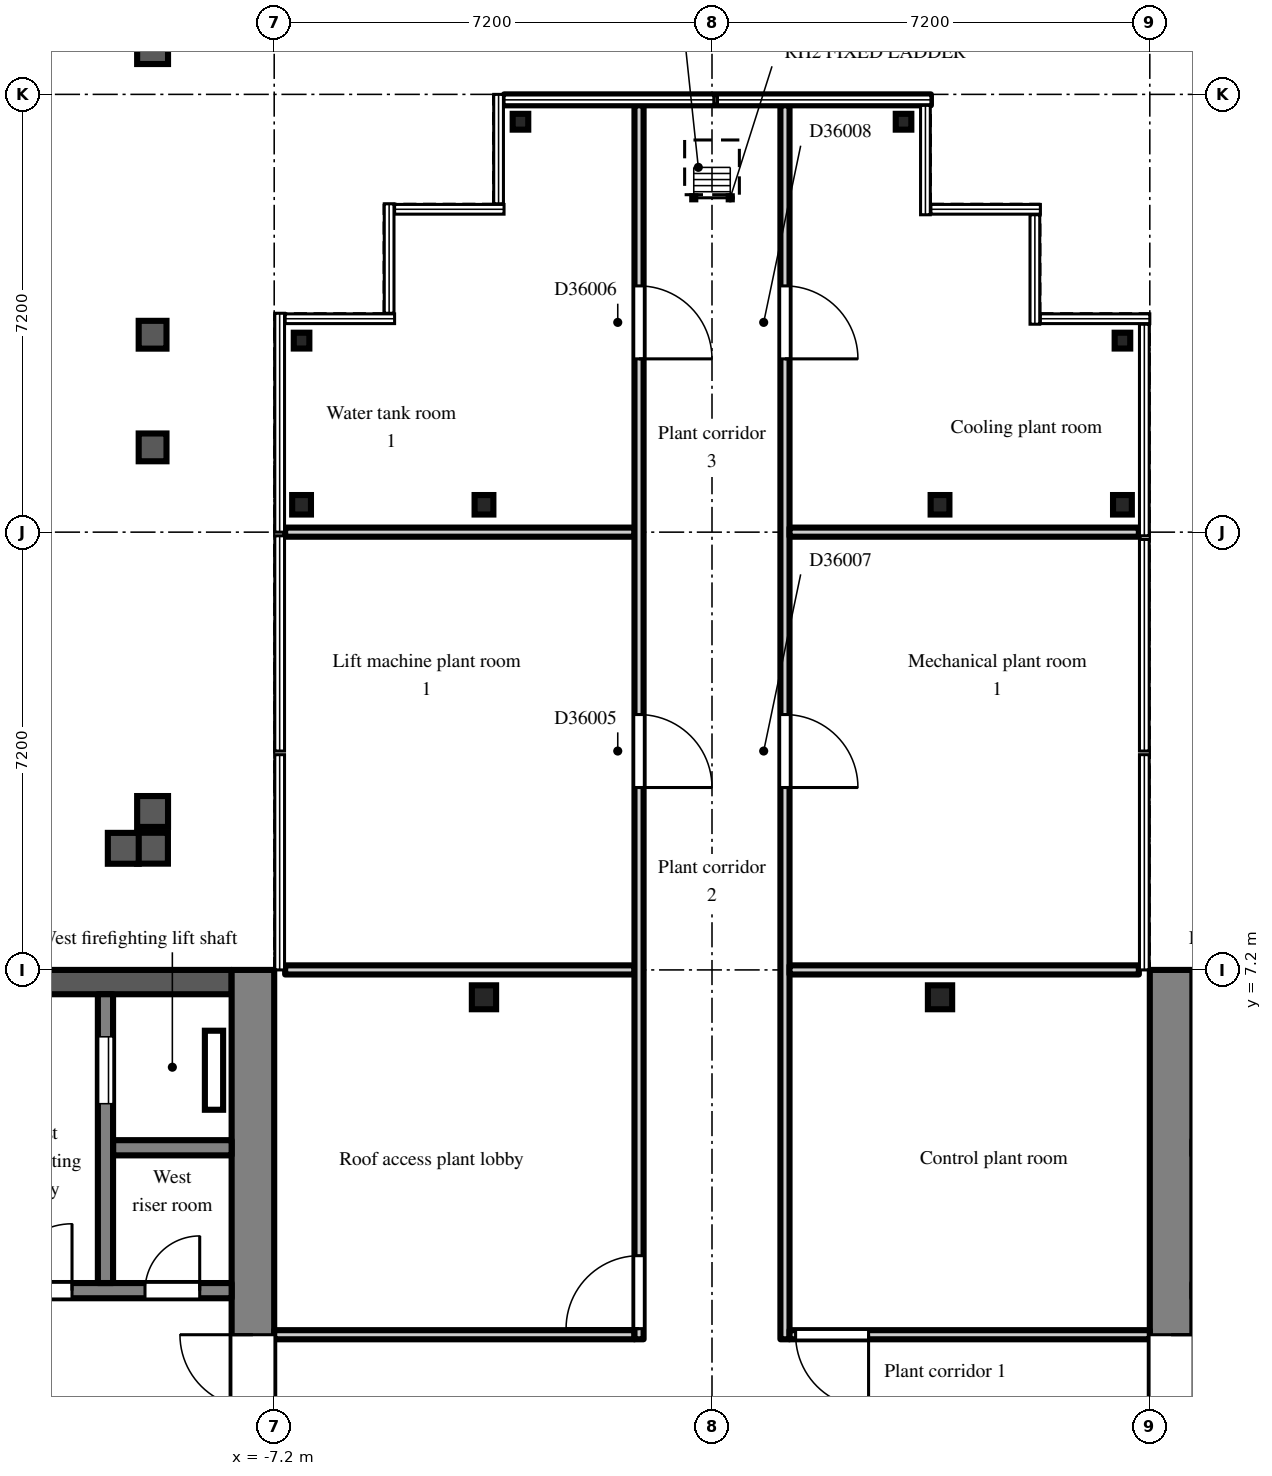
"""IFC4 building model, lengths in metres.
Left out: names, types, materials, properties, quantities, classifications, styles, units other than length and angle.
Written with IfcOpenShell. Run it as: python <this file> out.ifc"""

import sys

from ifc_helpers import new_model, si_unit, direction, frame, frame_2d, origin, origin_2d, place, context, subcontext, project, spatial, polyline, rectangle, i_section, outline, extrude, element, fill, save


model = new_model("IFC4")
c1 = context("Model", 3, precision=1e-05, world=origin(), true_north=direction((0.0, 1.0)))
c2 = subcontext(c1, "Body", "Model", "MODEL_VIEW")
j1 = project(units=[si_unit("LENGTHUNIT", "METRE"), si_unit("PLANEANGLEUNIT", "RADIAN")], contexts=[c1])
p1 = place(None, origin())
s1 = spatial("IfcSite", under=j1, at=p1, CompositionType="ELEMENT")
p2 = place(p1, origin())
s2 = spatial("IfcBuilding", under=s1, at=p2, CompositionType="ELEMENT")
p3 = place(p2, frame((0.0, 0.0, 247.5)))
s3 = spatial("IfcBuildingStorey", under=s2, at=p3, CompositionType="ELEMENT", Elevation=247.5)
p4 = place(p3, frame((-6.75, 14.85, 0.0), z_axis=(0.0, 0.0, 1.0), x_axis=(1.0, 0.0, 0.0)))
e1 = element("IfcColumn", 1, at=p4, inside=s3, PredefinedType="COLUMN", context=c2, shape_type="SweptSolid", body=[
    extrude(i_section(OverallWidth=0.309, OverallDepth=0.321, WebThickness=0.014, FlangeThickness=0.022, FilletRadius=0.015, at=origin_2d()), origin(), (0.0, 0.0, 1.0), 5.462),
])
p5 = place(p3, frame((-6.75, 17.55, 0.0), z_axis=(0.0, 0.0, 1.0), x_axis=(1.0, 0.0, 0.0)))
e2 = element("IfcColumn", 2, at=p5, inside=s3, PredefinedType="COLUMN", context=c2, shape_type="SweptSolid", body=[
    extrude(i_section(OverallWidth=0.256, OverallDepth=0.26, WebThickness=0.01, FlangeThickness=0.017, FilletRadius=0.013, at=origin_2d()), origin(), (0.0, 0.0, 1.0), 4.087),
])
p6 = place(p3, frame((-3.75, 6.75, 0.0), z_axis=(0.0, 0.0, 1.0), x_axis=(1.0, 0.0, 0.0)))
e3 = element("IfcColumn", 3, at=p6, inside=s3, PredefinedType="COLUMN", context=c2, shape_type="SweptSolid", body=[
    extrude(i_section(OverallWidth=0.399, OverallDepth=0.394, WebThickness=0.023, FlangeThickness=0.037, FilletRadius=0.015, at=origin_2d()), origin(), (0.0, 0.0, 1.0), 9.663),
])
p7 = place(p3, frame((-3.75, 14.85, 0.0), z_axis=(0.0, 0.0, 1.0), x_axis=(1.0, 0.0, 0.0)))
e4 = element("IfcColumn", 4, at=p7, inside=s3, PredefinedType="COLUMN", context=c2, shape_type="SweptSolid", body=[
    extrude(i_section(OverallWidth=0.309, OverallDepth=0.321, WebThickness=0.014, FlangeThickness=0.022, FilletRadius=0.015, at=origin_2d()), origin(), (0.0, 0.0, 1.0), 5.538),
])
for number, where, z_axis, x_axis in (
    (5, (-3.15, 21.15, 0.0), (0.0, 0.0, 1.0), (1.0, 0.0, 0.0)),
    (6, (3.15, 21.15, 0.0), (0.0, 0.0, 1.0), (1.0, 0.0, 0.0)),
):
    element("IfcColumn", number, at=place(p3, frame(where, z_axis=z_axis, x_axis=x_axis)), inside=s3, PredefinedType="COLUMN", context=c2, shape_type="SweptSolid", body=[
        extrude(i_section(OverallWidth=0.256, OverallDepth=0.26, WebThickness=0.01, FlangeThickness=0.017, FilletRadius=0.013, at=origin_2d()), origin(), (0.0, 0.0, 1.0), 2.479),
    ])
p8 = place(p3, frame((3.75, 6.75, 0.0), z_axis=(0.0, 0.0, 1.0), x_axis=(1.0, 0.0, 0.0)))
e7 = element("IfcColumn", 7, at=p8, inside=s3, PredefinedType="COLUMN", context=c2, shape_type="SweptSolid", body=[
    extrude(i_section(OverallWidth=0.399, OverallDepth=0.394, WebThickness=0.023, FlangeThickness=0.037, FilletRadius=0.015, at=origin_2d()), origin(), (0.0, 0.0, 1.0), 9.663),
])
p9 = place(p3, frame((3.75, 14.85, 0.0), z_axis=(0.0, 0.0, 1.0), x_axis=(1.0, 0.0, 0.0)))
e8 = element("IfcColumn", 8, at=p9, inside=s3, PredefinedType="COLUMN", context=c2, shape_type="SweptSolid", body=[
    extrude(i_section(OverallWidth=0.309, OverallDepth=0.321, WebThickness=0.014, FlangeThickness=0.022, FilletRadius=0.015, at=origin_2d()), origin(), (0.0, 0.0, 1.0), 5.538),
])
p10 = place(p3, frame((6.75, 14.85, 0.0), z_axis=(0.0, 0.0, 1.0), x_axis=(1.0, 0.0, 0.0)))
e9 = element("IfcColumn", 9, at=p10, inside=s3, PredefinedType="COLUMN", context=c2, shape_type="SweptSolid", body=[
    extrude(i_section(OverallWidth=0.309, OverallDepth=0.321, WebThickness=0.014, FlangeThickness=0.022, FilletRadius=0.015, at=origin_2d()), origin(), (0.0, 0.0, 1.0), 5.462),
])
p11 = place(p3, frame((6.75, 17.55, 0.0), z_axis=(0.0, 0.0, 1.0), x_axis=(1.0, 0.0, 0.0)))
e10 = element("IfcColumn", 10, at=p11, inside=s3, PredefinedType="COLUMN", context=c2, shape_type="SweptSolid", body=[
    extrude(i_section(OverallWidth=0.256, OverallDepth=0.26, WebThickness=0.01, FlangeThickness=0.017, FilletRadius=0.013, at=origin_2d()), origin(), (0.0, 0.0, 1.0), 4.087),
])
p12 = place(p3, frame((3.6, 21.51, 3.127), z_axis=(0.0, 0.0, 1.0), x_axis=(-1.0, 0.0, 0.0)))
e11 = element("IfcWall", 11, at=p12, inside=s3, PredefinedType="PARAPET", context=c2, shape_type="SweptSolid", body=[
    extrude(rectangle(XDim=7.02, YDim=0.18, at=frame_2d((3.51, 0.0))), origin(), (0.0, 0.0, 1.0), 1.1),
])
p13 = place(p3, frame((7.55, -7.2, 0.0), z_axis=(0.0, 0.0, 1.0), x_axis=(0.0, 1.0, 0.0)))
e12 = element("IfcWall", 12, at=p13, inside=s3, PredefinedType="SHEAR", context=c2, shape_type="SweptSolid", body=[
    extrude(outline(polyline([(0.0, 0.0), (14.4, 0.0), (14.4, 10.033), (7.2, 13.7), (0.0, 10.033), (0.0, 0.0)])), frame((0.0, 0.35, 0.0), z_axis=(0.0, -1.0, 0.0), x_axis=(1.0, 0.0, 0.0)), (0.0, 0.0, 1.0), 0.7),
])
p14 = place(p13, frame((6.0, 0.0, 0.0)))
e13 = element("IfcOpeningElement", 13, at=p14, cuts=e12, PredefinedType="OPENING", context=c2, shape_type="SweptSolid", body=[
    extrude(rectangle(XDim=2.4, YDim=2.2, at=frame_2d((1.2, 1.1))), frame((0.0, 0.36, 0.0), z_axis=(0.0, -1.0, 0.0), x_axis=(1.0, 0.0, 0.0)), (0.0, 0.0, 1.0), 0.72),
])
p15 = place(p3, frame((-7.55, -7.2, 0.0), z_axis=(0.0, 0.0, 1.0), x_axis=(0.0, 1.0, 0.0)))
e14 = element("IfcWall", 14, at=p15, inside=s3, PredefinedType="SHEAR", context=c2, shape_type="SweptSolid", body=[
    extrude(outline(polyline([(0.0, 0.0), (14.4, 0.0), (14.4, 10.033), (7.2, 13.7), (0.0, 10.033), (0.0, 0.0)])), frame((0.0, 0.35, 0.0), z_axis=(0.0, -1.0, 0.0), x_axis=(1.0, 0.0, 0.0)), (0.0, 0.0, 1.0), 0.7),
])
p16 = place(p15, frame((6.0, 0.0, 0.0)))
e15 = element("IfcOpeningElement", 15, at=p16, cuts=e14, PredefinedType="OPENING", context=c2, shape_type="SweptSolid", body=[
    extrude(rectangle(XDim=2.4, YDim=2.2, at=frame_2d((1.2, 1.1))), frame((0.0, 0.36, 0.0), z_axis=(0.0, -1.0, 0.0), x_axis=(1.0, 0.0, 0.0)), (0.0, 0.0, 1.0), 0.72),
])
p17 = place(p3, frame((-7.9, 7.0, 0.0), z_axis=(0.0, 0.0, 1.0), x_axis=(-1.0, 0.0, 0.0)))
e16 = element("IfcWall", 16, at=p17, inside=s3, PredefinedType="SHEAR", context=c2, shape_type="SweptSolid", body=[
    extrude(rectangle(XDim=12.95, YDim=0.4, at=frame_2d((6.475, 0.0))), origin(), (0.0, 0.0, 1.0), 10.135),
])
p18 = place(p3, frame((-7.9, 1.925, 0.0), z_axis=(0.0, 0.0, 1.0), x_axis=(-1.0, 0.0, 0.0)))
e17 = element("IfcWall", 17, at=p18, inside=s3, PredefinedType="SHEAR", context=c2, shape_type="SweptSolid", body=[
    extrude(rectangle(XDim=12.95, YDim=0.25, at=frame_2d((6.475, 0.0))), origin(), (0.0, 0.0, 1.0), 12.72),
])
p19 = place(p18, frame((0.525, 0.0, 0.0)))
e18 = element("IfcOpeningElement", 18, at=p19, cuts=e17, PredefinedType="OPENING", context=c2, shape_type="SweptSolid", body=[
    extrude(rectangle(XDim=0.9, YDim=2.1, at=frame_2d((0.45, 1.05))), frame((0.0, 0.135, 0.0), z_axis=(0.0, -1.0, 0.0), x_axis=(1.0, 0.0, 0.0)), (0.0, 0.0, 1.0), 0.27),
])
p20 = place(p18, frame((2.625, 0.0, 0.0)))
e19 = element("IfcOpeningElement", 19, at=p20, cuts=e17, PredefinedType="OPENING", context=c2, shape_type="SweptSolid", body=[
    extrude(rectangle(XDim=1.1, YDim=2.1, at=frame_2d((0.55, 1.05))), frame((0.0, 0.135, 0.0), z_axis=(0.0, -1.0, 0.0), x_axis=(1.0, 0.0, 0.0)), (0.0, 0.0, 1.0), 0.27),
])
p21 = place(p18, frame((4.925, 0.0, 0.0)))
e20 = element("IfcOpeningElement", 20, at=p21, cuts=e17, PredefinedType="OPENING", context=c2, shape_type="SweptSolid", body=[
    extrude(rectangle(XDim=0.9, YDim=2.1, at=frame_2d((0.45, 1.05))), frame((0.0, 0.135, 0.0), z_axis=(0.0, -1.0, 0.0), x_axis=(1.0, 0.0, 0.0)), (0.0, 0.0, 1.0), 0.27),
])
p22 = place(p18, frame((8.225, 0.0, 0.0)))
e21 = element("IfcOpeningElement", 21, at=p22, cuts=e17, PredefinedType="OPENING", context=c2, shape_type="SweptSolid", body=[
    extrude(rectangle(XDim=0.9, YDim=2.1, at=frame_2d((0.45, 1.05))), frame((0.0, 0.135, 0.0), z_axis=(0.0, -1.0, 0.0), x_axis=(1.0, 0.0, 0.0)), (0.0, 0.0, 1.0), 0.27),
])
p23 = place(p18, frame((11.525, 0.0, 0.0)))
e22 = element("IfcOpeningElement", 22, at=p23, cuts=e17, PredefinedType="OPENING", context=c2, shape_type="SweptSolid", body=[
    extrude(rectangle(XDim=0.9, YDim=2.1, at=frame_2d((0.45, 1.05))), frame((0.0, 0.135, 0.0), z_axis=(0.0, -1.0, 0.0), x_axis=(1.0, 0.0, 0.0)), (0.0, 0.0, 1.0), 0.27),
])
p24 = place(p3, frame((-7.9, 4.275, 0.0), z_axis=(0.0, 0.0, 1.0), x_axis=(-1.0, 0.0, 0.0)))
e23 = element("IfcWall", 23, at=p24, inside=s3, PredefinedType="SHEAR", context=c2, shape_type="SweptSolid", body=[
    extrude(rectangle(XDim=1.95, YDim=0.25, at=frame_2d((0.975, 0.0))), origin(), (0.0, 0.0, 1.0), 11.523),
])
p25 = place(p3, frame((-9.975, 2.05, 0.0), z_axis=(0.0, 0.0, 1.0), x_axis=(0.0, 1.0, 0.0)))
e24 = element("IfcWall", 24, at=p25, inside=s3, PredefinedType="SHEAR", context=c2, shape_type="SweptSolid", body=[
    extrude(outline(polyline([(0.0, 0.0), (4.75, 0.0), (4.75, 10.237), (0.0, 12.656), (0.0, 0.0)])), frame((0.0, 0.125, 0.0), z_axis=(0.0, -1.0, 0.0), x_axis=(1.0, 0.0, 0.0)), (0.0, 0.0, 1.0), 0.25),
])
p26 = place(p25, frame((2.95, 0.0, 0.0)))
e25 = element("IfcOpeningElement", 25, at=p26, cuts=e24, PredefinedType="OPENING", context=c2, shape_type="SweptSolid", body=[
    extrude(rectangle(XDim=1.1, YDim=2.1, at=frame_2d((0.55, 1.05))), frame((0.0, 0.135, 0.0), z_axis=(0.0, -1.0, 0.0), x_axis=(1.0, 0.0, 0.0)), (0.0, 0.0, 1.0), 0.27),
])
p27 = place(p3, frame((-7.2, 1.2, 0.0), z_axis=(0.0, 0.0, 1.0), x_axis=(1.0, 0.0, 0.0)))
e26 = element("IfcWall", 26, at=p27, inside=s3, PredefinedType="PARTITIONING", context=c2, shape_type="SweptSolid", body=[
    extrude(rectangle(XDim=5.925, YDim=0.15, at=frame_2d((2.962, 0.0))), origin(), (0.0, 0.0, 1.0), 2.7),
])
for number, where, z_axis, x_axis in (
    (27, (-7.02, 7.2, 0.0), (0.0, 0.0, 1.0), (1.0, 0.0, 0.0)),
    (28, (-7.02, 14.4, 0.0), (0.0, 0.0, 1.0), (1.0, 0.0, 0.0)),
):
    element("IfcWall", number, at=place(p3, frame(where, z_axis=z_axis, x_axis=x_axis)), inside=s3, PredefinedType="PARTITIONING", context=c2, shape_type="SweptSolid", body=[
        extrude(rectangle(XDim=5.745, YDim=0.15, at=frame_2d((2.873, 0.0))), origin(), (0.0, 0.0, 1.0), 2.7),
    ])
p28 = place(p3, frame((-1.2, 1.125, 0.0), z_axis=(0.0, 0.0, 1.0), x_axis=(0.0, 1.0, 0.0)))
e29 = element("IfcWall", 29, at=p28, inside=s3, PredefinedType="PARTITIONING", context=c2, shape_type="SweptSolid", body=[
    extrude(rectangle(XDim=20.295, YDim=0.15, at=frame_2d((10.147, 0.0))), origin(), (0.0, 0.0, 1.0), 2.7),
])
p29 = place(p28, frame((0.175, 0.0, 0.0)))
e30 = element("IfcOpeningElement", 30, at=p29, cuts=e29, PredefinedType="OPENING", context=c2, shape_type="SweptSolid", body=[
    extrude(rectangle(XDim=1.2, YDim=2.1, at=frame_2d((0.6, 1.05))), frame((0.0, 0.085, 0.0), z_axis=(0.0, -1.0, 0.0), x_axis=(1.0, 0.0, 0.0)), (0.0, 0.0, 1.0), 0.17),
])
p30 = place(p28, frame((9.075, 0.0, 0.0)))
e31 = element("IfcOpeningElement", 31, at=p30, cuts=e29, PredefinedType="OPENING", context=c2, shape_type="SweptSolid", body=[
    extrude(rectangle(XDim=1.2, YDim=2.1, at=frame_2d((0.6, 1.05))), frame((0.0, 0.085, 0.0), z_axis=(0.0, -1.0, 0.0), x_axis=(1.0, 0.0, 0.0)), (0.0, 0.0, 1.0), 0.17),
])
p31 = place(p28, frame((16.125, 0.0, 0.0)))
e32 = element("IfcOpeningElement", 32, at=p31, cuts=e29, PredefinedType="OPENING", context=c2, shape_type="SweptSolid", body=[
    extrude(rectangle(XDim=1.2, YDim=2.1, at=frame_2d((0.6, 1.05))), frame((0.0, 0.085, 0.0), z_axis=(0.0, -1.0, 0.0), x_axis=(1.0, 0.0, 0.0)), (0.0, 0.0, 1.0), 0.17),
])
p32 = place(p3, frame((1.2, 1.125, 0.0), z_axis=(0.0, 0.0, 1.0), x_axis=(0.0, 1.0, 0.0)))
e33 = element("IfcWall", 33, at=p32, inside=s3, PredefinedType="PARTITIONING", context=c2, shape_type="SweptSolid", body=[
    extrude(rectangle(XDim=20.295, YDim=0.15, at=frame_2d((10.147, 0.0))), origin(), (0.0, 0.0, 1.0), 2.7),
])
p33 = place(p32, frame((9.075, 0.0, 0.0)))
e34 = element("IfcOpeningElement", 34, at=p33, cuts=e33, PredefinedType="OPENING", context=c2, shape_type="SweptSolid", body=[
    extrude(rectangle(XDim=1.2, YDim=2.1, at=frame_2d((0.6, 1.05))), frame((0.0, 0.085, 0.0), z_axis=(0.0, -1.0, 0.0), x_axis=(1.0, 0.0, 0.0)), (0.0, 0.0, 1.0), 0.17),
])
p34 = place(p32, frame((16.125, 0.0, 0.0)))
e35 = element("IfcOpeningElement", 35, at=p34, cuts=e33, PredefinedType="OPENING", context=c2, shape_type="SweptSolid", body=[
    extrude(rectangle(XDim=1.2, YDim=2.1, at=frame_2d((0.6, 1.05))), frame((0.0, 0.085, 0.0), z_axis=(0.0, -1.0, 0.0), x_axis=(1.0, 0.0, 0.0)), (0.0, 0.0, 1.0), 0.17),
])
p35 = place(p3, frame((1.275, 1.2, 0.0), z_axis=(0.0, 0.0, 1.0), x_axis=(1.0, 0.0, 0.0)))
e36 = element("IfcWall", 36, at=p35, inside=s3, PredefinedType="PARTITIONING", context=c2, shape_type="SweptSolid", body=[
    extrude(rectangle(XDim=5.925, YDim=0.15, at=frame_2d((2.962, 0.0))), origin(), (0.0, 0.0, 1.0), 2.7),
])
p36 = place(p35, frame((0.1, 0.0, 0.0)))
e37 = element("IfcOpeningElement", 37, at=p36, cuts=e36, PredefinedType="OPENING", context=c2, shape_type="SweptSolid", body=[
    extrude(rectangle(XDim=1.2, YDim=2.1, at=frame_2d((0.6, 1.05))), frame((0.0, 0.085, 0.0), z_axis=(0.0, -1.0, 0.0), x_axis=(1.0, 0.0, 0.0)), (0.0, 0.0, 1.0), 0.17),
])
for number, where, z_axis, x_axis in (
    (38, (1.275, 7.2, 0.0), (0.0, 0.0, 1.0), (1.0, 0.0, 0.0)),
    (39, (1.275, 14.4, 0.0), (0.0, 0.0, 1.0), (1.0, 0.0, 0.0)),
):
    element("IfcWall", number, at=place(p3, frame(where, z_axis=z_axis, x_axis=x_axis)), inside=s3, PredefinedType="PARTITIONING", context=c2, shape_type="SweptSolid", body=[
        extrude(rectangle(XDim=5.745, YDim=0.15, at=frame_2d((2.873, 0.0))), origin(), (0.0, 0.0, 1.0), 2.7),
    ])
p37 = place(p3, frame((28.8, 3.6, 12.203), z_axis=(0.0, 0.453805918275, 0.891100549062), x_axis=(-1.0, 0.0, 0.0)))
p38 = place(p37, frame((28.8, -18.853, 0.02)))
p39 = place(p38, frame((0.0, 0.0, -0.07)))
e40 = element("IfcDoor", 40, at=p39, inside=s3, OperationType="NOTDEFINED", PredefinedType="TRAPDOOR", context=c2, shape_type="SweptSolid", body=[
    extrude(rectangle(XDim=0.9, YDim=0.9, at=frame_2d((0.0, 0.0), x_axis=(-1.0, 0.0))), origin(), (0.0, 0.0, 1.0), 0.05),
])
p40 = place(p14, frame((2.4, 0.0, 0.0), z_axis=(0.0, 0.0, 1.0), x_axis=(-1.0, 0.0, 0.0)))
e41 = element("IfcDoor", 41, at=p40, inside=s3, OperationType="DOUBLE_DOOR_DOUBLE_SWING", PredefinedType="DOOR", context=c2, shape_type="SweptSolid", body=[
    extrude(rectangle(XDim=2.4, YDim=2.2, at=frame_2d((1.2, 1.1))), frame((0.0, 0.025, 0.0), z_axis=(0.0, -1.0, 0.0), x_axis=(1.0, 0.0, 0.0)), (0.0, 0.0, 1.0), 0.05),
])
fill(e13, e41)
p41 = place(p26, origin())
e42 = element("IfcDoor", 42, at=p41, inside=s3, OperationType="SLIDING_TO_LEFT", PredefinedType="DOOR", context=c2, shape_type="SweptSolid", body=[
    extrude(rectangle(XDim=1.1, YDim=2.1, at=frame_2d((0.55, 1.05))), frame((0.0, 0.025, 0.0), z_axis=(0.0, -1.0, 0.0), x_axis=(1.0, 0.0, 0.0)), (0.0, 0.0, 1.0), 0.05),
])
fill(e25, e42)
p42 = place(p19, frame((0.9, 0.0, 0.0), z_axis=(0.0, 0.0, 1.0), x_axis=(-1.0, 0.0, 0.0)))
e43 = element("IfcDoor", 43, at=p42, inside=s3, OperationType="SINGLE_SWING_RIGHT", PredefinedType="DOOR", context=c2, shape_type="SweptSolid", body=[
    extrude(rectangle(XDim=0.9, YDim=2.1, at=frame_2d((0.45, 1.05))), frame((0.0, 0.025, 0.0), z_axis=(0.0, -1.0, 0.0), x_axis=(1.0, 0.0, 0.0)), (0.0, 0.0, 1.0), 0.05),
])
fill(e18, e43)
p43 = place(p20, frame((1.1, 0.0, 0.0), z_axis=(0.0, 0.0, 1.0), x_axis=(-1.0, 0.0, 0.0)))
e44 = element("IfcDoor", 44, at=p43, inside=s3, OperationType="SINGLE_SWING_RIGHT", PredefinedType="DOOR", context=c2, shape_type="SweptSolid", body=[
    extrude(rectangle(XDim=1.1, YDim=2.1, at=frame_2d((0.55, 1.05))), frame((0.0, 0.025, 0.0), z_axis=(0.0, -1.0, 0.0), x_axis=(1.0, 0.0, 0.0)), (0.0, 0.0, 1.0), 0.05),
])
fill(e19, e44)
p44 = place(p16, origin())
e45 = element("IfcDoor", 45, at=p44, inside=s3, OperationType="DOUBLE_DOOR_DOUBLE_SWING", PredefinedType="DOOR", context=c2, shape_type="SweptSolid", body=[
    extrude(rectangle(XDim=2.4, YDim=2.2, at=frame_2d((1.2, 1.1))), frame((0.0, 0.025, 0.0), z_axis=(0.0, -1.0, 0.0), x_axis=(1.0, 0.0, 0.0)), (0.0, 0.0, 1.0), 0.05),
])
fill(e15, e45)
p45 = place(p36, frame((1.2, 0.0, 0.0), z_axis=(0.0, 0.0, 1.0), x_axis=(-1.0, 0.0, 0.0)))
e46 = element("IfcDoor", 46, at=p45, inside=s3, OperationType="SINGLE_SWING_LEFT", PredefinedType="DOOR", context=c2, shape_type="SweptSolid", body=[
    extrude(rectangle(XDim=1.2, YDim=2.1, at=frame_2d((0.6, 1.05))), frame((0.0, 0.025, 0.0), z_axis=(0.0, -1.0, 0.0), x_axis=(1.0, 0.0, 0.0)), (0.0, 0.0, 1.0), 0.05),
])
fill(e37, e46)
p46 = place(p29, origin())
e47 = element("IfcDoor", 47, at=p46, inside=s3, OperationType="SINGLE_SWING_LEFT", PredefinedType="DOOR", context=c2, shape_type="SweptSolid", body=[
    extrude(rectangle(XDim=1.2, YDim=2.1, at=frame_2d((0.6, 1.05))), frame((0.0, 0.025, 0.0), z_axis=(0.0, -1.0, 0.0), x_axis=(1.0, 0.0, 0.0)), (0.0, 0.0, 1.0), 0.05),
])
fill(e30, e47)
p47 = place(p30, frame((1.2, 0.0, 0.0), z_axis=(0.0, 0.0, 1.0), x_axis=(-1.0, 0.0, 0.0)))
e48 = element("IfcDoor", 48, at=p47, inside=s3, OperationType="SINGLE_SWING_RIGHT", PredefinedType="DOOR", context=c2, shape_type="SweptSolid", body=[
    extrude(rectangle(XDim=1.2, YDim=2.1, at=frame_2d((0.6, 1.05))), frame((0.0, 0.025, 0.0), z_axis=(0.0, -1.0, 0.0), x_axis=(1.0, 0.0, 0.0)), (0.0, 0.0, 1.0), 0.05),
])
fill(e31, e48)
p48 = place(p31, frame((1.2, 0.0, 0.0), z_axis=(0.0, 0.0, 1.0), x_axis=(-1.0, 0.0, 0.0)))
e49 = element("IfcDoor", 49, at=p48, inside=s3, OperationType="SINGLE_SWING_RIGHT", PredefinedType="DOOR", context=c2, shape_type="SweptSolid", body=[
    extrude(rectangle(XDim=1.2, YDim=2.1, at=frame_2d((0.6, 1.05))), frame((0.0, 0.025, 0.0), z_axis=(0.0, -1.0, 0.0), x_axis=(1.0, 0.0, 0.0)), (0.0, 0.0, 1.0), 0.05),
])
fill(e32, e49)
p49 = place(p33, frame((1.2, 0.0, 0.0), z_axis=(0.0, 0.0, 1.0), x_axis=(-1.0, 0.0, 0.0)))
e50 = element("IfcDoor", 50, at=p49, inside=s3, OperationType="SINGLE_SWING_RIGHT", PredefinedType="DOOR", context=c2, shape_type="SweptSolid", body=[
    extrude(rectangle(XDim=1.2, YDim=2.1, at=frame_2d((0.6, 1.05))), frame((0.0, 0.025, 0.0), z_axis=(0.0, -1.0, 0.0), x_axis=(1.0, 0.0, 0.0)), (0.0, 0.0, 1.0), 0.05),
])
fill(e34, e50)
p50 = place(p34, frame((1.2, 0.0, 0.0), z_axis=(0.0, 0.0, 1.0), x_axis=(-1.0, 0.0, 0.0)))
e51 = element("IfcDoor", 51, at=p50, inside=s3, OperationType="SINGLE_SWING_RIGHT", PredefinedType="DOOR", context=c2, shape_type="SweptSolid", body=[
    extrude(rectangle(XDim=1.2, YDim=2.1, at=frame_2d((0.6, 1.05))), frame((0.0, 0.025, 0.0), z_axis=(0.0, -1.0, 0.0), x_axis=(1.0, 0.0, 0.0)), (0.0, 0.0, 1.0), 0.05),
])
fill(e35, e51)
save(model, sys.argv[1])
